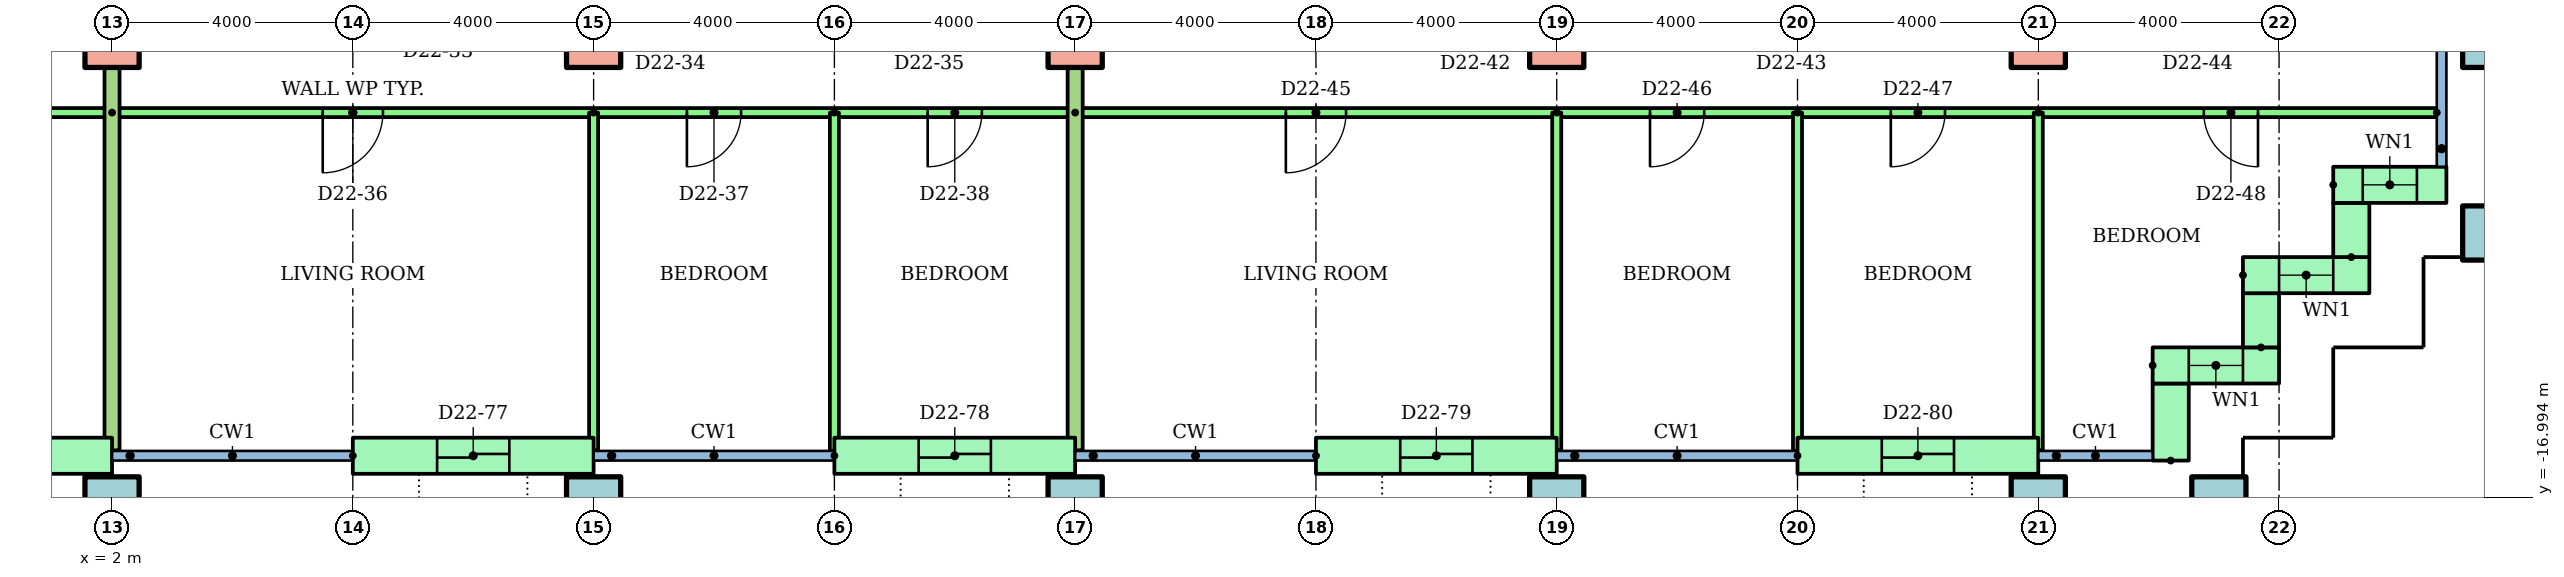
"""IFC4 building model, lengths in metres.
Left out: names, types, materials, properties, quantities, classifications, styles, units other than length and angle.
Written with IfcOpenShell. Run it as: python <this file> out.ifc"""

import sys

from ifc_helpers import new_model, si_unit, direction, frame, frame_2d, origin, origin_2d, place, context, subcontext, project, spatial, rectangle, hollow_rectangle, extrude, element, fill, save


model = new_model("IFC4")
c1 = context("Model", 3, precision=1e-05, world=origin(), true_north=direction((0.0, 1.0)))
c2 = subcontext(c1, "Body", "Model", "MODEL_VIEW")
j1 = project(units=[si_unit("LENGTHUNIT", "METRE"), si_unit("PLANEANGLEUNIT", "RADIAN")], contexts=[c1])
p1 = place(None, origin())
s1 = spatial("IfcSite", under=j1, at=p1, CompositionType="ELEMENT")
p2 = place(p1, origin())
s2 = spatial("IfcBuilding", under=s1, at=p2, CompositionType="ELEMENT")
p3 = place(p2, frame((0.0, 0.0, 87.1)))
s3 = spatial("IfcBuildingStorey", under=s2, at=p3, CompositionType="ELEMENT", Elevation=87.1)
for number, where in (
    (1, (2.0, -17.1, 0.0)),
    (2, (10.0, -17.1, 0.0)),
    (3, (18.0, -17.1, 0.0)),
    (4, (26.0, -17.1, 0.0)),
    (5, (34.0, -17.1, 0.0)),
    (6, (37.0, -17.1, 0.0)),
    (7, (41.5, -12.6, 0.0)),
):
    element("IfcColumn", number, at=place(p3, frame(where)), inside=s3, PredefinedType="COLUMN", context=c2, shape_type="SweptSolid", body=[
        extrude(hollow_rectangle(XDim=0.9, YDim=0.9, WallThickness=0.045, at=origin_2d()), origin(), (0.0, 0.0, 1.0), 3.2),
    ])
for number, where in (
    (8, (2.0, -9.4, 0.0)),
    (9, (10.0, -9.4, 0.0)),
    (10, (18.0, -9.4, 0.0)),
    (11, (26.0, -9.4, 0.0)),
    (12, (34.0, -9.4, 0.0)),
):
    element("IfcColumn", number, at=place(p3, frame(where)), inside=s3, PredefinedType="COLUMN", context=c2, shape_type="SweptSolid", body=[
        extrude(rectangle(XDim=0.9, YDim=0.9, at=origin_2d()), origin(), (0.0, 0.0, 1.0), 3.2),
    ])
p4 = place(p3, frame((41.5, -9.4, 0.0)))
e13 = element("IfcColumn", 13, at=p4, inside=s3, PredefinedType="COLUMN", context=c2, shape_type="SweptSolid", body=[
    extrude(hollow_rectangle(XDim=0.9, YDim=0.9, WallThickness=0.045, at=origin_2d()), origin(), (0.0, 0.0, 1.0), 3.2),
])
p5 = place(p3, frame((-2.0, -16.3, 0.0)))
e14 = element("IfcWall", 14, at=p5, inside=s3, PredefinedType="STANDARD", context=c2, shape_type="SweptSolid", body=[
    extrude(rectangle(XDim=4.0, YDim=0.6, at=frame_2d((2.0, 0.0))), origin(), (0.0, 0.0, 1.0), 2.92),
])
p6 = place(p5, frame((1.4, 0.0, 0.0)))
e15 = element("IfcOpeningElement", 15, at=p6, cuts=e14, PredefinedType="OPENING", context=c2, shape_type="SweptSolid", body=[
    extrude(rectangle(XDim=1.2, YDim=2.1, at=frame_2d((0.6, 1.05))), frame((0.0, 0.31, 0.0), z_axis=(0.0, -1.0, 0.0), x_axis=(1.0, 0.0, 0.0)), (0.0, 0.0, 1.0), 0.62),
])
p7 = place(p3, frame((6.0, -16.3, 0.0)))
e16 = element("IfcWall", 16, at=p7, inside=s3, PredefinedType="STANDARD", context=c2, shape_type="SweptSolid", body=[
    extrude(rectangle(XDim=4.0, YDim=0.6, at=frame_2d((2.0, 0.0))), origin(), (0.0, 0.0, 1.0), 2.92),
])
p8 = place(p7, frame((1.4, 0.0, 0.0)))
e17 = element("IfcOpeningElement", 17, at=p8, cuts=e16, PredefinedType="OPENING", context=c2, shape_type="SweptSolid", body=[
    extrude(rectangle(XDim=1.2, YDim=2.1, at=frame_2d((0.6, 1.05))), frame((0.0, 0.31, 0.0), z_axis=(0.0, -1.0, 0.0), x_axis=(1.0, 0.0, 0.0)), (0.0, 0.0, 1.0), 0.62),
])
p9 = place(p3, frame((14.0, -16.3, 0.0)))
e18 = element("IfcWall", 18, at=p9, inside=s3, PredefinedType="STANDARD", context=c2, shape_type="SweptSolid", body=[
    extrude(rectangle(XDim=4.0, YDim=0.6, at=frame_2d((2.0, 0.0))), origin(), (0.0, 0.0, 1.0), 2.92),
])
p10 = place(p9, frame((1.4, 0.0, 0.0)))
e19 = element("IfcOpeningElement", 19, at=p10, cuts=e18, PredefinedType="OPENING", context=c2, shape_type="SweptSolid", body=[
    extrude(rectangle(XDim=1.2, YDim=2.1, at=frame_2d((0.6, 1.05))), frame((0.0, 0.31, 0.0), z_axis=(0.0, -1.0, 0.0), x_axis=(1.0, 0.0, 0.0)), (0.0, 0.0, 1.0), 0.62),
])
p11 = place(p3, frame((22.0, -16.3, 0.0)))
e20 = element("IfcWall", 20, at=p11, inside=s3, PredefinedType="STANDARD", context=c2, shape_type="SweptSolid", body=[
    extrude(rectangle(XDim=4.0, YDim=0.6, at=frame_2d((2.0, 0.0))), origin(), (0.0, 0.0, 1.0), 2.92),
])
p12 = place(p11, frame((1.4, 0.0, 0.0)))
e21 = element("IfcOpeningElement", 21, at=p12, cuts=e20, PredefinedType="OPENING", context=c2, shape_type="SweptSolid", body=[
    extrude(rectangle(XDim=1.2, YDim=2.1, at=frame_2d((0.6, 1.05))), frame((0.0, 0.31, 0.0), z_axis=(0.0, -1.0, 0.0), x_axis=(1.0, 0.0, 0.0)), (0.0, 0.0, 1.0), 0.62),
])
p13 = place(p3, frame((30.0, -16.3, 0.0)))
e22 = element("IfcWall", 22, at=p13, inside=s3, PredefinedType="STANDARD", context=c2, shape_type="SweptSolid", body=[
    extrude(rectangle(XDim=4.0, YDim=0.6, at=frame_2d((2.0, 0.0))), origin(), (0.0, 0.0, 1.0), 2.92),
])
p14 = place(p13, frame((1.4, 0.0, 0.0)))
e23 = element("IfcOpeningElement", 23, at=p14, cuts=e22, PredefinedType="OPENING", context=c2, shape_type="SweptSolid", body=[
    extrude(rectangle(XDim=1.2, YDim=2.1, at=frame_2d((0.6, 1.05))), frame((0.0, 0.31, 0.0), z_axis=(0.0, -1.0, 0.0), x_axis=(1.0, 0.0, 0.0)), (0.0, 0.0, 1.0), 0.62),
])
p15 = place(p3, frame((36.2, -16.38, 0.0), z_axis=(0.0, 0.0, 1.0), x_axis=(0.0, 1.0, 0.0)))
e24 = element("IfcWall", 24, at=p15, inside=s3, PredefinedType="STANDARD", context=c2, shape_type="SweptSolid", body=[
    extrude(rectangle(XDim=1.28, YDim=0.6, at=frame_2d((0.64, 0.0))), origin(), (0.0, 0.0, 1.0), 2.92),
])
p16 = place(p3, frame((35.9, -14.8, 0.0)))
e25 = element("IfcWall", 25, at=p16, inside=s3, PredefinedType="STANDARD", context=c2, shape_type="SweptSolid", body=[
    extrude(rectangle(XDim=2.1, YDim=0.6, at=frame_2d((1.05, 0.0))), origin(), (0.0, 0.0, 1.0), 2.92),
])
p17 = place(p16, frame((0.6, 0.0, 0.9)))
e26 = element("IfcOpeningElement", 26, at=p17, cuts=e25, PredefinedType="OPENING", context=c2, shape_type="SweptSolid", body=[
    extrude(rectangle(XDim=0.9, YDim=1.5, at=frame_2d((0.45, 0.75))), frame((0.0, 0.31, 0.0), z_axis=(0.0, -1.0, 0.0), x_axis=(1.0, 0.0, 0.0)), (0.0, 0.0, 1.0), 0.62),
])
p18 = place(p3, frame((37.7, -14.5, 0.0), z_axis=(0.0, 0.0, 1.0), x_axis=(0.0, 1.0, 0.0)))
e27 = element("IfcWall", 27, at=p18, inside=s3, PredefinedType="STANDARD", context=c2, shape_type="SweptSolid", body=[
    extrude(rectangle(XDim=0.9, YDim=0.6, at=frame_2d((0.45, 0.0))), origin(), (0.0, 0.0, 1.0), 2.92),
])
p19 = place(p3, frame((37.4, -13.3, 0.0)))
e28 = element("IfcWall", 28, at=p19, inside=s3, PredefinedType="STANDARD", context=c2, shape_type="SweptSolid", body=[
    extrude(rectangle(XDim=2.1, YDim=0.6, at=frame_2d((1.05, 0.0))), origin(), (0.0, 0.0, 1.0), 2.92),
])
p20 = place(p19, frame((0.6, 0.0, 0.9)))
e29 = element("IfcOpeningElement", 29, at=p20, cuts=e28, PredefinedType="OPENING", context=c2, shape_type="SweptSolid", body=[
    extrude(rectangle(XDim=0.9, YDim=1.5, at=frame_2d((0.45, 0.75))), frame((0.0, 0.31, 0.0), z_axis=(0.0, -1.0, 0.0), x_axis=(1.0, 0.0, 0.0)), (0.0, 0.0, 1.0), 0.62),
])
p21 = place(p3, frame((39.2, -13.0, 0.0), z_axis=(0.0, 0.0, 1.0), x_axis=(0.0, 1.0, 0.0)))
e30 = element("IfcWall", 30, at=p21, inside=s3, PredefinedType="STANDARD", context=c2, shape_type="SweptSolid", body=[
    extrude(rectangle(XDim=0.9, YDim=0.6, at=frame_2d((0.45, 0.0))), origin(), (0.0, 0.0, 1.0), 2.92),
])
p22 = place(p3, frame((38.9, -11.8, 0.0)))
e31 = element("IfcWall", 31, at=p22, inside=s3, PredefinedType="STANDARD", context=c2, shape_type="SweptSolid", body=[
    extrude(rectangle(XDim=1.88, YDim=0.6, at=frame_2d((0.94, 0.0))), origin(), (0.0, 0.0, 1.0), 2.92),
])
p23 = place(p22, frame((0.49, 0.0, 0.9)))
e32 = element("IfcOpeningElement", 32, at=p23, cuts=e31, PredefinedType="OPENING", context=c2, shape_type="SweptSolid", body=[
    extrude(rectangle(XDim=0.9, YDim=1.5, at=frame_2d((0.45, 0.75))), frame((0.0, 0.31, 0.0), z_axis=(0.0, -1.0, 0.0), x_axis=(1.0, 0.0, 0.0)), (0.0, 0.0, 1.0), 0.62),
])
p24 = place(p3, frame((2.0, -10.6, 0.0), z_axis=(0.0, 0.0, 1.0), x_axis=(-1.0, 0.0, 0.0)))
e33 = element("IfcWall", 33, at=p24, inside=s3, PredefinedType="PARTITIONING", context=c2, shape_type="SweptSolid", body=[
    extrude(rectangle(XDim=16.0, YDim=0.15, at=frame_2d((8.0, 0.0))), origin(), (0.0, 0.0, 1.0), 2.4),
])
p25 = place(p24, frame((13.55, 0.0, 0.0)))
e34 = element("IfcOpeningElement", 34, at=p25, cuts=e33, PredefinedType="OPENING", context=c2, shape_type="SweptSolid", body=[
    extrude(rectangle(XDim=0.9, YDim=2.1, at=frame_2d((0.45, 1.05))), frame((0.0, 0.085, 0.0), z_axis=(0.0, -1.0, 0.0), x_axis=(1.0, 0.0, 0.0)), (0.0, 0.0, 1.0), 0.17),
])
p26 = place(p24, frame((9.55, 0.0, 0.0)))
e35 = element("IfcOpeningElement", 35, at=p26, cuts=e33, PredefinedType="OPENING", context=c2, shape_type="SweptSolid", body=[
    extrude(rectangle(XDim=0.9, YDim=2.1, at=frame_2d((0.45, 1.05))), frame((0.0, 0.085, 0.0), z_axis=(0.0, -1.0, 0.0), x_axis=(1.0, 0.0, 0.0)), (0.0, 0.0, 1.0), 0.17),
])
p27 = place(p24, frame((3.5, 0.0, 0.0)))
e36 = element("IfcOpeningElement", 36, at=p27, cuts=e33, PredefinedType="OPENING", context=c2, shape_type="SweptSolid", body=[
    extrude(rectangle(XDim=1.0, YDim=2.1, at=frame_2d((0.5, 1.05))), frame((0.0, 0.085, 0.0), z_axis=(0.0, -1.0, 0.0), x_axis=(1.0, 0.0, 0.0)), (0.0, 0.0, 1.0), 0.17),
])
p28 = place(p3, frame((18.0, -10.6, 0.0), z_axis=(0.0, 0.0, 1.0), x_axis=(-1.0, 0.0, 0.0)))
e37 = element("IfcWall", 37, at=p28, inside=s3, PredefinedType="PARTITIONING", context=c2, shape_type="SweptSolid", body=[
    extrude(rectangle(XDim=16.0, YDim=0.15, at=frame_2d((8.0, 0.0))), origin(), (0.0, 0.0, 1.0), 2.4),
])
p29 = place(p28, frame((11.5, 0.0, 0.0)))
e38 = element("IfcOpeningElement", 38, at=p29, cuts=e37, PredefinedType="OPENING", context=c2, shape_type="SweptSolid", body=[
    extrude(rectangle(XDim=1.0, YDim=2.1, at=frame_2d((0.5, 1.05))), frame((0.0, 0.085, 0.0), z_axis=(0.0, -1.0, 0.0), x_axis=(1.0, 0.0, 0.0)), (0.0, 0.0, 1.0), 0.17),
])
p30 = place(p28, frame((5.55, 0.0, 0.0)))
e39 = element("IfcOpeningElement", 39, at=p30, cuts=e37, PredefinedType="OPENING", context=c2, shape_type="SweptSolid", body=[
    extrude(rectangle(XDim=0.9, YDim=2.1, at=frame_2d((0.45, 1.05))), frame((0.0, 0.085, 0.0), z_axis=(0.0, -1.0, 0.0), x_axis=(1.0, 0.0, 0.0)), (0.0, 0.0, 1.0), 0.17),
])
p31 = place(p28, frame((1.55, 0.0, 0.0)))
e40 = element("IfcOpeningElement", 40, at=p31, cuts=e37, PredefinedType="OPENING", context=c2, shape_type="SweptSolid", body=[
    extrude(rectangle(XDim=0.9, YDim=2.1, at=frame_2d((0.45, 1.05))), frame((0.0, 0.085, 0.0), z_axis=(0.0, -1.0, 0.0), x_axis=(1.0, 0.0, 0.0)), (0.0, 0.0, 1.0), 0.17),
])
p32 = place(p3, frame((10.0, -10.6, 0.0), z_axis=(0.0, 0.0, 1.0), x_axis=(0.0, -1.0, 0.0)))
e41 = element("IfcWall", 41, at=p32, inside=s3, PredefinedType="PARTITIONING", context=c2, shape_type="SweptSolid", body=[
    extrude(rectangle(XDim=5.61, YDim=0.15, at=frame_2d((2.805, 0.0))), origin(), (0.0, 0.0, 1.0), 2.4),
])
p33 = place(p3, frame((14.0, -10.6, 0.0), z_axis=(0.0, 0.0, 1.0), x_axis=(0.0, -1.0, 0.0)))
e42 = element("IfcWall", 42, at=p33, inside=s3, PredefinedType="PARTITIONING", context=c2, shape_type="SweptSolid", body=[
    extrude(rectangle(XDim=5.621, YDim=0.15, at=frame_2d((2.811, 0.0))), origin(), (0.0, 0.0, 1.0), 2.4),
])
p34 = place(p3, frame((2.0, -1.4, 0.0), z_axis=(0.0, 0.0, 1.0), x_axis=(0.0, -1.0, 0.0)))
e43 = element("IfcWall", 43, at=p34, inside=s3, PredefinedType="PARTITIONING", context=c2, shape_type="SweptSolid", body=[
    extrude(rectangle(XDim=14.81, YDim=0.25, at=frame_2d((7.405, 0.0))), origin(), (0.0, 0.0, 1.0), 2.4),
])
p35 = place(p3, frame((40.62, -10.6, 0.0), z_axis=(0.0, 0.0, 1.0), x_axis=(-1.0, 0.0, 0.0)))
e44 = element("IfcWall", 44, at=p35, inside=s3, PredefinedType="PARTITIONING", context=c2, shape_type="SweptSolid", body=[
    extrude(rectangle(XDim=22.62, YDim=0.15, at=frame_2d((11.31, 0.0))), origin(), (0.0, 0.0, 1.0), 2.4),
])
p36 = place(p35, frame((18.12, 0.0, 0.0)))
e45 = element("IfcOpeningElement", 45, at=p36, cuts=e44, PredefinedType="OPENING", context=c2, shape_type="SweptSolid", body=[
    extrude(rectangle(XDim=1.0, YDim=2.1, at=frame_2d((0.5, 1.05))), frame((0.0, 0.085, 0.0), z_axis=(0.0, -1.0, 0.0), x_axis=(1.0, 0.0, 0.0)), (0.0, 0.0, 1.0), 0.17),
])
p37 = place(p35, frame((12.17, 0.0, 0.0)))
e46 = element("IfcOpeningElement", 46, at=p37, cuts=e44, PredefinedType="OPENING", context=c2, shape_type="SweptSolid", body=[
    extrude(rectangle(XDim=0.9, YDim=2.1, at=frame_2d((0.45, 1.05))), frame((0.0, 0.085, 0.0), z_axis=(0.0, -1.0, 0.0), x_axis=(1.0, 0.0, 0.0)), (0.0, 0.0, 1.0), 0.17),
])
p38 = place(p35, frame((8.17, 0.0, 0.0)))
e47 = element("IfcOpeningElement", 47, at=p38, cuts=e44, PredefinedType="OPENING", context=c2, shape_type="SweptSolid", body=[
    extrude(rectangle(XDim=0.9, YDim=2.1, at=frame_2d((0.45, 1.05))), frame((0.0, 0.085, 0.0), z_axis=(0.0, -1.0, 0.0), x_axis=(1.0, 0.0, 0.0)), (0.0, 0.0, 1.0), 0.17),
])
p39 = place(p35, frame((2.97, 0.0, 0.0)))
e48 = element("IfcOpeningElement", 48, at=p39, cuts=e44, PredefinedType="OPENING", context=c2, shape_type="SweptSolid", body=[
    extrude(rectangle(XDim=0.9, YDim=2.1, at=frame_2d((0.45, 1.05))), frame((0.0, 0.085, 0.0), z_axis=(0.0, -1.0, 0.0), x_axis=(1.0, 0.0, 0.0)), (0.0, 0.0, 1.0), 0.17),
])
p40 = place(p3, frame((26.0, -10.6, 0.0), z_axis=(0.0, 0.0, 1.0), x_axis=(0.0, -1.0, 0.0)))
e49 = element("IfcWall", 49, at=p40, inside=s3, PredefinedType="PARTITIONING", context=c2, shape_type="SweptSolid", body=[
    extrude(rectangle(XDim=5.61, YDim=0.15, at=frame_2d((2.805, 0.0))), origin(), (0.0, 0.0, 1.0), 2.4),
])
p41 = place(p3, frame((30.0, -10.6, 0.0), z_axis=(0.0, 0.0, 1.0), x_axis=(0.0, -1.0, 0.0)))
e50 = element("IfcWall", 50, at=p41, inside=s3, PredefinedType="PARTITIONING", context=c2, shape_type="SweptSolid", body=[
    extrude(rectangle(XDim=5.621, YDim=0.15, at=frame_2d((2.811, 0.0))), origin(), (0.0, 0.0, 1.0), 2.4),
])
p42 = place(p3, frame((34.0, -10.6, 0.0), z_axis=(0.0, 0.0, 1.0), x_axis=(0.0, -1.0, 0.0)))
e51 = element("IfcWall", 51, at=p42, inside=s3, PredefinedType="PARTITIONING", context=c2, shape_type="SweptSolid", body=[
    extrude(rectangle(XDim=5.61, YDim=0.15, at=frame_2d((2.805, 0.0))), origin(), (0.0, 0.0, 1.0), 2.4),
])
p43 = place(p3, frame((18.0, -1.4, 0.0), z_axis=(0.0, 0.0, 1.0), x_axis=(0.0, -1.0, 0.0)))
e52 = element("IfcWall", 52, at=p43, inside=s3, PredefinedType="PARTITIONING", context=c2, shape_type="SweptSolid", body=[
    extrude(rectangle(XDim=14.81, YDim=0.25, at=frame_2d((7.405, 0.0))), origin(), (0.0, 0.0, 1.0), 2.4),
])
p44 = place(p17, origin())
e53 = element("IfcWindow", 53, at=p44, inside=s3, PartitioningType="SINGLE_PANEL", PredefinedType="WINDOW", context=c2, shape_type="SweptSolid", body=[
    extrude(rectangle(XDim=0.9, YDim=1.5, at=frame_2d((0.45, 0.75))), frame((0.0, 0.03, 0.0), z_axis=(0.0, -1.0, 0.0), x_axis=(1.0, 0.0, 0.0)), (0.0, 0.0, 1.0), 0.06),
])
fill(e26, e53)
p45 = place(p20, origin())
e54 = element("IfcWindow", 54, at=p45, inside=s3, PartitioningType="SINGLE_PANEL", PredefinedType="WINDOW", context=c2, shape_type="SweptSolid", body=[
    extrude(rectangle(XDim=0.9, YDim=1.5, at=frame_2d((0.45, 0.75))), frame((0.0, 0.03, 0.0), z_axis=(0.0, -1.0, 0.0), x_axis=(1.0, 0.0, 0.0)), (0.0, 0.0, 1.0), 0.06),
])
fill(e29, e54)
p46 = place(p23, origin())
e55 = element("IfcWindow", 55, at=p46, inside=s3, PartitioningType="SINGLE_PANEL", PredefinedType="WINDOW", context=c2, shape_type="SweptSolid", body=[
    extrude(rectangle(XDim=0.9, YDim=1.5, at=frame_2d((0.45, 0.75))), frame((0.0, 0.03, 0.0), z_axis=(0.0, -1.0, 0.0), x_axis=(1.0, 0.0, 0.0)), (0.0, 0.0, 1.0), 0.06),
])
fill(e32, e55)
p47 = place(p29, origin())
e56 = element("IfcDoor", 56, at=p47, inside=s3, OperationType="SINGLE_SWING_RIGHT", PredefinedType="DOOR", context=c2, shape_type="SweptSolid", body=[
    extrude(rectangle(XDim=1.0, YDim=2.1, at=frame_2d((0.5, 1.05))), frame((0.0, 0.025, 0.0), z_axis=(0.0, -1.0, 0.0), x_axis=(1.0, 0.0, 0.0)), (0.0, 0.0, 1.0), 0.05),
])
fill(e38, e56)
p48 = place(p30, origin())
e57 = element("IfcDoor", 57, at=p48, inside=s3, OperationType="SINGLE_SWING_RIGHT", PredefinedType="DOOR", context=c2, shape_type="SweptSolid", body=[
    extrude(rectangle(XDim=0.9, YDim=2.1, at=frame_2d((0.45, 1.05))), frame((0.0, 0.025, 0.0), z_axis=(0.0, -1.0, 0.0), x_axis=(1.0, 0.0, 0.0)), (0.0, 0.0, 1.0), 0.05),
])
fill(e39, e57)
p49 = place(p31, origin())
e58 = element("IfcDoor", 58, at=p49, inside=s3, OperationType="SINGLE_SWING_RIGHT", PredefinedType="DOOR", context=c2, shape_type="SweptSolid", body=[
    extrude(rectangle(XDim=0.9, YDim=2.1, at=frame_2d((0.45, 1.05))), frame((0.0, 0.025, 0.0), z_axis=(0.0, -1.0, 0.0), x_axis=(1.0, 0.0, 0.0)), (0.0, 0.0, 1.0), 0.05),
])
fill(e40, e58)
p50 = place(p36, origin())
e59 = element("IfcDoor", 59, at=p50, inside=s3, OperationType="SINGLE_SWING_RIGHT", PredefinedType="DOOR", context=c2, shape_type="SweptSolid", body=[
    extrude(rectangle(XDim=1.0, YDim=2.1, at=frame_2d((0.5, 1.05))), frame((0.0, 0.025, 0.0), z_axis=(0.0, -1.0, 0.0), x_axis=(1.0, 0.0, 0.0)), (0.0, 0.0, 1.0), 0.05),
])
fill(e45, e59)
p51 = place(p37, origin())
e60 = element("IfcDoor", 60, at=p51, inside=s3, OperationType="SINGLE_SWING_RIGHT", PredefinedType="DOOR", context=c2, shape_type="SweptSolid", body=[
    extrude(rectangle(XDim=0.9, YDim=2.1, at=frame_2d((0.45, 1.05))), frame((0.0, 0.025, 0.0), z_axis=(0.0, -1.0, 0.0), x_axis=(1.0, 0.0, 0.0)), (0.0, 0.0, 1.0), 0.05),
])
fill(e46, e60)
p52 = place(p38, origin())
e61 = element("IfcDoor", 61, at=p52, inside=s3, OperationType="SINGLE_SWING_RIGHT", PredefinedType="DOOR", context=c2, shape_type="SweptSolid", body=[
    extrude(rectangle(XDim=0.9, YDim=2.1, at=frame_2d((0.45, 1.05))), frame((0.0, 0.025, 0.0), z_axis=(0.0, -1.0, 0.0), x_axis=(1.0, 0.0, 0.0)), (0.0, 0.0, 1.0), 0.05),
])
fill(e47, e61)
p53 = place(p39, origin())
e62 = element("IfcDoor", 62, at=p53, inside=s3, OperationType="SINGLE_SWING_LEFT", PredefinedType="DOOR", context=c2, shape_type="SweptSolid", body=[
    extrude(rectangle(XDim=0.9, YDim=2.1, at=frame_2d((0.45, 1.05))), frame((0.0, 0.025, 0.0), z_axis=(0.0, -1.0, 0.0), x_axis=(1.0, 0.0, 0.0)), (0.0, 0.0, 1.0), 0.05),
])
fill(e48, e62)
p54 = place(p8, origin())
e63 = element("IfcDoor", 63, at=p54, inside=s3, OperationType="SLIDING_TO_LEFT", PredefinedType="DOOR", context=c2, shape_type="SweptSolid", body=[
    extrude(rectangle(XDim=1.2, YDim=2.1, at=frame_2d((0.6, 1.05))), frame((0.0, 0.025, 0.0), z_axis=(0.0, -1.0, 0.0), x_axis=(1.0, 0.0, 0.0)), (0.0, 0.0, 1.0), 0.05),
])
fill(e17, e63)
p55 = place(p10, origin())
e64 = element("IfcDoor", 64, at=p55, inside=s3, OperationType="SLIDING_TO_LEFT", PredefinedType="DOOR", context=c2, shape_type="SweptSolid", body=[
    extrude(rectangle(XDim=1.2, YDim=2.1, at=frame_2d((0.6, 1.05))), frame((0.0, 0.025, 0.0), z_axis=(0.0, -1.0, 0.0), x_axis=(1.0, 0.0, 0.0)), (0.0, 0.0, 1.0), 0.05),
])
fill(e19, e64)
p56 = place(p12, origin())
e65 = element("IfcDoor", 65, at=p56, inside=s3, OperationType="SLIDING_TO_LEFT", PredefinedType="DOOR", context=c2, shape_type="SweptSolid", body=[
    extrude(rectangle(XDim=1.2, YDim=2.1, at=frame_2d((0.6, 1.05))), frame((0.0, 0.025, 0.0), z_axis=(0.0, -1.0, 0.0), x_axis=(1.0, 0.0, 0.0)), (0.0, 0.0, 1.0), 0.05),
])
fill(e21, e65)
p57 = place(p14, origin())
e66 = element("IfcDoor", 66, at=p57, inside=s3, OperationType="SLIDING_TO_LEFT", PredefinedType="DOOR", context=c2, shape_type="SweptSolid", body=[
    extrude(rectangle(XDim=1.2, YDim=2.1, at=frame_2d((0.6, 1.05))), frame((0.0, 0.025, 0.0), z_axis=(0.0, -1.0, 0.0), x_axis=(1.0, 0.0, 0.0)), (0.0, 0.0, 1.0), 0.05),
])
fill(e23, e66)
save(model, sys.argv[1])
